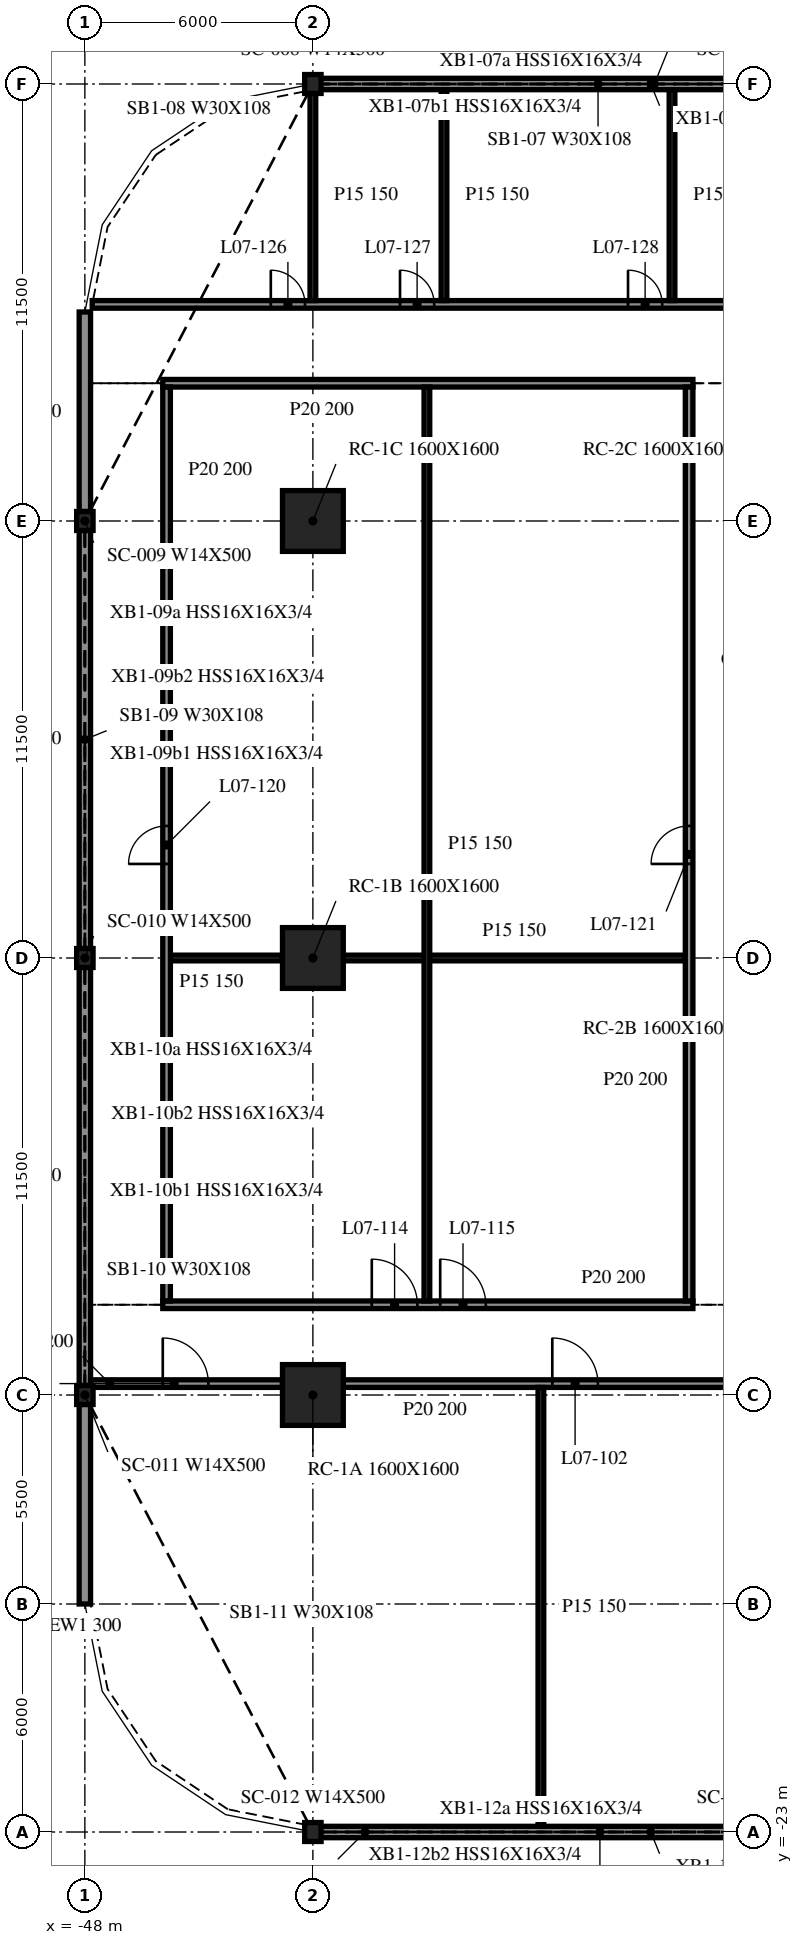
"""IFC4 building model, lengths in metres.
Left out: names, types, materials, properties, quantities, classifications, styles, units other than length and angle.
Written with IfcOpenShell. Run it as: python <this file> out.ifc"""

import sys

from ifc_helpers import new_model, si_unit, direction, frame, frame_2d, origin, origin_2d, place, context, subcontext, project, spatial, rectangle, i_section, extrude, element, fill, save


model = new_model("IFC4")
c1 = context("Model", 3, precision=1e-05, world=origin(), true_north=direction((0.0, 1.0)))
c2 = subcontext(c1, "Body", "Model", "MODEL_VIEW")
j1 = project(units=[si_unit("LENGTHUNIT", "METRE"), si_unit("PLANEANGLEUNIT", "RADIAN")], contexts=[c1])
p1 = place(None, origin())
s1 = spatial("IfcSite", under=j1, at=p1, CompositionType="ELEMENT")
p2 = place(p1, origin())
s2 = spatial("IfcBuilding", under=s1, at=p2, CompositionType="ELEMENT")
p3 = place(p2, frame((0.0, 0.0, 33.0)))
s3 = spatial("IfcBuildingStorey", under=s2, at=p3, CompositionType="ELEMENT", Elevation=33.0)
for number, where, z_axis, x_axis in (
    (1, (-42.0, -11.5, -0.34), (0.0, 0.0, 1.0), (1.0, 0.0, 0.0)),
    (2, (-42.0, 0.0, -0.34), (0.0, 0.0, 1.0), (1.0, 0.0, 0.0)),
    (3, (-42.0, 11.5, -0.34), (0.0, 0.0, 1.0), (1.0, 0.0, 0.0)),
):
    element("IfcColumn", number, at=place(p3, frame(where, z_axis=z_axis, x_axis=x_axis)), inside=s3, PredefinedType="COLUMN", context=c2, shape_type="SweptSolid", body=[
        extrude(rectangle(XDim=1.6, YDim=1.6, at=origin_2d()), origin(), (0.0, 0.0, 1.0), 4.3),
    ])
for number, where, z_axis, x_axis in (
    (4, (-42.0, 23.0, -0.34), (0.0, 0.0, 1.0), (1.0, 0.0, 0.0)),
    (5, (-48.0, 11.5, -0.34), (0.0, 0.0, 1.0), (1.0, 0.0, 0.0)),
    (6, (-48.0, 0.0, -0.34), (0.0, 0.0, 1.0), (1.0, 0.0, 0.0)),
    (7, (-48.0, -11.5, -0.34), (0.0, 0.0, 1.0), (1.0, 0.0, 0.0)),
    (8, (-42.0, -23.0, -0.34), (0.0, 0.0, 1.0), (1.0, 0.0, 0.0)),
):
    element("IfcColumn", number, at=place(p3, frame(where, z_axis=z_axis, x_axis=x_axis)), inside=s3, PredefinedType="COLUMN", context=c2, shape_type="SweptSolid", body=[
        extrude(i_section(OverallWidth=0.432, OverallDepth=0.498, WebThickness=0.056, FlangeThickness=0.089, at=origin_2d()), origin(), (0.0, 0.0, 1.0), 4.3),
    ])
p4 = place(p3, frame((-30.028, 23.0, 0.0), z_axis=(0.0, 0.0, 1.0), x_axis=(-1.0, 0.0, 0.0)))
e9 = element("IfcWall", 9, at=p4, inside=s3, PredefinedType="NOTDEFINED", context=c2, shape_type="SweptSolid", body=[
    extrude(rectangle(XDim=11.944, YDim=0.3, at=frame_2d((5.972, 0.0))), origin(), (0.0, 0.0, 1.0), 3.203),
])
p5 = place(p3, frame((-48.0, 17.0, 0.0), z_axis=(0.0, 0.0, 1.0), x_axis=(0.0, -1.0, 0.0)))
e10 = element("IfcWall", 10, at=p5, inside=s3, PredefinedType="NOTDEFINED", context=c2, shape_type="SweptSolid", body=[
    extrude(rectangle(XDim=5.251, YDim=0.3, at=frame_2d((2.625, 0.0))), origin(), (0.0, 0.0, 1.0), 3.203),
])
for number, where, z_axis, x_axis in (
    (11, (-48.0, 11.251, 0.0), (0.0, 0.0, 1.0), (0.0, -1.0, 0.0)),
    (12, (-48.0, -0.249, 0.0), (0.0, 0.0, 1.0), (0.0, -1.0, 0.0)),
):
    element("IfcWall", number, at=place(p3, frame(where, z_axis=z_axis, x_axis=x_axis)), inside=s3, PredefinedType="NOTDEFINED", context=c2, shape_type="SweptSolid", body=[
        extrude(rectangle(XDim=11.002, YDim=0.3, at=frame_2d((5.501, 0.0))), origin(), (0.0, 0.0, 1.0), 3.203),
    ])
p6 = place(p3, frame((-48.0, -11.749, 0.0), z_axis=(0.0, 0.0, 1.0), x_axis=(0.0, -1.0, 0.0)))
e13 = element("IfcWall", 13, at=p6, inside=s3, PredefinedType="NOTDEFINED", context=c2, shape_type="SweptSolid", body=[
    extrude(rectangle(XDim=5.251, YDim=0.3, at=frame_2d((2.625, 0.0))), origin(), (0.0, 0.0, 1.0), 3.203),
])
p7 = place(p3, frame((-41.972, -23.0, 0.0), z_axis=(0.0, 0.0, 1.0), x_axis=(1.0, 0.0, 0.0)))
e14 = element("IfcWall", 14, at=p7, inside=s3, PredefinedType="NOTDEFINED", context=c2, shape_type="SweptSolid", body=[
    extrude(rectangle(XDim=11.944, YDim=0.3, at=frame_2d((5.972, 0.0))), origin(), (0.0, 0.0, 1.0), 3.203),
])
p8 = place(p3, frame((-47.85, -11.2, 0.0), z_axis=(0.0, 0.0, 1.0), x_axis=(1.0, 0.0, 0.0)))
e15 = element("IfcWall", 15, at=p8, inside=s3, PredefinedType="PARTITIONING", context=c2, shape_type="SweptSolid", body=[
    extrude(rectangle(XDim=5.05, YDim=0.2, at=frame_2d((2.525, 0.0))), origin(), (0.0, 0.0, 1.0), 3.96),
])
p9 = place(p8, frame((1.9, 0.0, 0.0)))
e16 = element("IfcOpeningElement", 16, at=p9, cuts=e15, PredefinedType="OPENING", context=c2, shape_type="SweptSolid", body=[
    extrude(rectangle(XDim=1.2, YDim=2.1, at=frame_2d((0.6, 1.05))), frame((0.0, 0.11, 0.0), z_axis=(0.0, -1.0, 0.0), x_axis=(1.0, 0.0, 0.0)), (0.0, 0.0, 1.0), 0.22),
])
p10 = place(p3, frame((-41.2, -11.2, 0.0), z_axis=(0.0, 0.0, 1.0), x_axis=(1.0, 0.0, 0.0)))
e17 = element("IfcWall", 17, at=p10, inside=s3, PredefinedType="PARTITIONING", context=c2, shape_type="SweptSolid", body=[
    extrude(rectangle(XDim=10.4, YDim=0.2, at=frame_2d((5.2, 0.0))), origin(), (0.0, 0.0, 1.0), 3.96),
])
p11 = place(p10, frame((5.5, 0.0, 0.0)))
e18 = element("IfcOpeningElement", 18, at=p11, cuts=e17, PredefinedType="OPENING", context=c2, shape_type="SweptSolid", body=[
    extrude(rectangle(XDim=1.2, YDim=2.1, at=frame_2d((0.6, 1.05))), frame((0.0, 0.11, 0.0), z_axis=(0.0, -1.0, 0.0), x_axis=(1.0, 0.0, 0.0)), (0.0, 0.0, 1.0), 0.22),
])
p12 = place(p3, frame((-45.95, -9.125, 0.0), z_axis=(0.0, 0.0, 1.0), x_axis=(1.0, 0.0, 0.0)))
e19 = element("IfcWall", 19, at=p12, inside=s3, PredefinedType="PARTITIONING", context=c2, shape_type="SweptSolid", body=[
    extrude(rectangle(XDim=13.95, YDim=0.2, at=frame_2d((6.975, 0.0))), origin(), (0.0, 0.0, 1.0), 3.96),
])
p13 = place(p12, frame((5.5, 0.0, 0.0)))
e20 = element("IfcOpeningElement", 20, at=p13, cuts=e19, PredefinedType="OPENING", context=c2, shape_type="SweptSolid", body=[
    extrude(rectangle(XDim=1.2, YDim=2.1, at=frame_2d((0.6, 1.05))), frame((0.0, 0.11, 0.0), z_axis=(0.0, -1.0, 0.0), x_axis=(1.0, 0.0, 0.0)), (0.0, 0.0, 1.0), 0.22),
])
p14 = place(p12, frame((7.3, 0.0, 0.0)))
e21 = element("IfcOpeningElement", 21, at=p14, cuts=e19, PredefinedType="OPENING", context=c2, shape_type="SweptSolid", body=[
    extrude(rectangle(XDim=1.2, YDim=2.1, at=frame_2d((0.6, 1.05))), frame((0.0, 0.11, 0.0), z_axis=(0.0, -1.0, 0.0), x_axis=(1.0, 0.0, 0.0)), (0.0, 0.0, 1.0), 0.22),
])
p15 = place(p3, frame((-45.75, 0.0, 0.0), z_axis=(0.0, 0.0, 1.0), x_axis=(1.0, 0.0, 0.0)))
e22 = element("IfcWall", 22, at=p15, inside=s3, PredefinedType="PARTITIONING", context=c2, shape_type="SweptSolid", body=[
    extrude(rectangle(XDim=2.95, YDim=0.15, at=frame_2d((1.475, 0.0))), origin(), (0.0, 0.0, 1.0), 3.96),
])
p16 = place(p3, frame((-41.2, 0.0, 0.0), z_axis=(0.0, 0.0, 1.0), x_axis=(1.0, 0.0, 0.0)))
e23 = element("IfcWall", 23, at=p16, inside=s3, PredefinedType="PARTITIONING", context=c2, shape_type="SweptSolid", body=[
    extrude(rectangle(XDim=9.0, YDim=0.15, at=frame_2d((4.5, 0.0))), origin(), (0.0, 0.0, 1.0), 3.96),
])
p17 = place(p3, frame((-45.95, 15.125, 0.0), z_axis=(0.0, 0.0, 1.0), x_axis=(1.0, 0.0, 0.0)))
e24 = element("IfcWall", 24, at=p17, inside=s3, PredefinedType="PARTITIONING", context=c2, shape_type="SweptSolid", body=[
    extrude(rectangle(XDim=13.95, YDim=0.2, at=frame_2d((6.975, 0.0))), origin(), (0.0, 0.0, 1.0), 3.96),
])
p18 = place(p3, frame((-47.807, 17.2, 0.0), z_axis=(0.0, 0.0, 1.0), x_axis=(1.0, 0.0, 0.0)))
e25 = element("IfcWall", 25, at=p18, inside=s3, PredefinedType="PARTITIONING", context=c2, shape_type="SweptSolid", body=[
    extrude(rectangle(XDim=95.615, YDim=0.2, at=frame_2d((47.807, 0.0))), origin(), (0.0, 0.0, 1.0), 3.96),
])
p19 = place(p18, frame((4.7, 0.0, 0.0)))
e26 = element("IfcOpeningElement", 26, at=p19, cuts=e25, PredefinedType="OPENING", context=c2, shape_type="SweptSolid", body=[
    extrude(rectangle(XDim=0.9, YDim=2.1, at=frame_2d((0.45, 1.05))), frame((0.0, 0.11, 0.0), z_axis=(0.0, -1.0, 0.0), x_axis=(1.0, 0.0, 0.0)), (0.0, 0.0, 1.0), 0.22),
])
p20 = place(p18, frame((8.1, 0.0, 0.0)))
e27 = element("IfcOpeningElement", 27, at=p20, cuts=e25, PredefinedType="OPENING", context=c2, shape_type="SweptSolid", body=[
    extrude(rectangle(XDim=0.9, YDim=2.1, at=frame_2d((0.45, 1.05))), frame((0.0, 0.11, 0.0), z_axis=(0.0, -1.0, 0.0), x_axis=(1.0, 0.0, 0.0)), (0.0, 0.0, 1.0), 0.22),
])
p21 = place(p18, frame((14.1, 0.0, 0.0)))
e28 = element("IfcOpeningElement", 28, at=p21, cuts=e25, PredefinedType="OPENING", context=c2, shape_type="SweptSolid", body=[
    extrude(rectangle(XDim=0.9, YDim=2.1, at=frame_2d((0.45, 1.05))), frame((0.0, 0.11, 0.0), z_axis=(0.0, -1.0, 0.0), x_axis=(1.0, 0.0, 0.0)), (0.0, 0.0, 1.0), 0.22),
])
p22 = place(p18, frame((22.7, 0.0, 0.0)))
e29 = element("IfcOpeningElement", 29, at=p22, cuts=e25, PredefinedType="OPENING", context=c2, shape_type="SweptSolid", body=[
    extrude(rectangle(XDim=0.9, YDim=2.1, at=frame_2d((0.45, 1.05))), frame((0.0, 0.11, 0.0), z_axis=(0.0, -1.0, 0.0), x_axis=(1.0, 0.0, 0.0)), (0.0, 0.0, 1.0), 0.22),
])
p23 = place(p18, frame((28.7, 0.0, 0.0)))
e30 = element("IfcOpeningElement", 30, at=p23, cuts=e25, PredefinedType="OPENING", context=c2, shape_type="SweptSolid", body=[
    extrude(rectangle(XDim=0.9, YDim=2.1, at=frame_2d((0.45, 1.05))), frame((0.0, 0.11, 0.0), z_axis=(0.0, -1.0, 0.0), x_axis=(1.0, 0.0, 0.0)), (0.0, 0.0, 1.0), 0.22),
])
p24 = place(p18, frame((34.7, 0.0, 0.0)))
e31 = element("IfcOpeningElement", 31, at=p24, cuts=e25, PredefinedType="OPENING", context=c2, shape_type="SweptSolid", body=[
    extrude(rectangle(XDim=0.9, YDim=2.1, at=frame_2d((0.45, 1.05))), frame((0.0, 0.11, 0.0), z_axis=(0.0, -1.0, 0.0), x_axis=(1.0, 0.0, 0.0)), (0.0, 0.0, 1.0), 0.22),
])
p25 = place(p18, frame((38.1, 0.0, 0.0)))
e32 = element("IfcOpeningElement", 32, at=p25, cuts=e25, PredefinedType="OPENING", context=c2, shape_type="SweptSolid", body=[
    extrude(rectangle(XDim=0.9, YDim=2.1, at=frame_2d((0.45, 1.05))), frame((0.0, 0.11, 0.0), z_axis=(0.0, -1.0, 0.0), x_axis=(1.0, 0.0, 0.0)), (0.0, 0.0, 1.0), 0.22),
])
p26 = place(p18, frame((43.7, 0.0, 0.0)))
e33 = element("IfcOpeningElement", 33, at=p26, cuts=e25, PredefinedType="OPENING", context=c2, shape_type="SweptSolid", body=[
    extrude(rectangle(XDim=0.9, YDim=2.1, at=frame_2d((0.45, 1.05))), frame((0.0, 0.11, 0.0), z_axis=(0.0, -1.0, 0.0), x_axis=(1.0, 0.0, 0.0)), (0.0, 0.0, 1.0), 0.22),
])
p27 = place(p18, frame((47.3, 0.0, 0.0)))
e34 = element("IfcOpeningElement", 34, at=p27, cuts=e25, PredefinedType="OPENING", context=c2, shape_type="SweptSolid", body=[
    extrude(rectangle(XDim=0.9, YDim=2.1, at=frame_2d((0.45, 1.05))), frame((0.0, 0.11, 0.0), z_axis=(0.0, -1.0, 0.0), x_axis=(1.0, 0.0, 0.0)), (0.0, 0.0, 1.0), 0.22),
])
p28 = place(p18, frame((54.1, 0.0, 0.0)))
e35 = element("IfcOpeningElement", 35, at=p28, cuts=e25, PredefinedType="OPENING", context=c2, shape_type="SweptSolid", body=[
    extrude(rectangle(XDim=0.9, YDim=2.1, at=frame_2d((0.45, 1.05))), frame((0.0, 0.11, 0.0), z_axis=(0.0, -1.0, 0.0), x_axis=(1.0, 0.0, 0.0)), (0.0, 0.0, 1.0), 0.22),
])
p29 = place(p18, frame((60.1, 0.0, 0.0)))
e36 = element("IfcOpeningElement", 36, at=p29, cuts=e25, PredefinedType="OPENING", context=c2, shape_type="SweptSolid", body=[
    extrude(rectangle(XDim=0.9, YDim=2.1, at=frame_2d((0.45, 1.05))), frame((0.0, 0.11, 0.0), z_axis=(0.0, -1.0, 0.0), x_axis=(1.0, 0.0, 0.0)), (0.0, 0.0, 1.0), 0.22),
])
p30 = place(p18, frame((66.1, 0.0, 0.0)))
e37 = element("IfcOpeningElement", 37, at=p30, cuts=e25, PredefinedType="OPENING", context=c2, shape_type="SweptSolid", body=[
    extrude(rectangle(XDim=0.9, YDim=2.1, at=frame_2d((0.45, 1.05))), frame((0.0, 0.11, 0.0), z_axis=(0.0, -1.0, 0.0), x_axis=(1.0, 0.0, 0.0)), (0.0, 0.0, 1.0), 0.22),
])
p31 = place(p18, frame((69.1, 0.0, 0.0)))
e38 = element("IfcOpeningElement", 38, at=p31, cuts=e25, PredefinedType="OPENING", context=c2, shape_type="SweptSolid", body=[
    extrude(rectangle(XDim=0.9, YDim=2.1, at=frame_2d((0.45, 1.05))), frame((0.0, 0.11, 0.0), z_axis=(0.0, -1.0, 0.0), x_axis=(1.0, 0.0, 0.0)), (0.0, 0.0, 1.0), 0.22),
])
p32 = place(p18, frame((75.1, 0.0, 0.0)))
e39 = element("IfcOpeningElement", 39, at=p32, cuts=e25, PredefinedType="OPENING", context=c2, shape_type="SweptSolid", body=[
    extrude(rectangle(XDim=0.9, YDim=2.1, at=frame_2d((0.45, 1.05))), frame((0.0, 0.11, 0.0), z_axis=(0.0, -1.0, 0.0), x_axis=(1.0, 0.0, 0.0)), (0.0, 0.0, 1.0), 0.22),
])
p33 = place(p18, frame((84.1, 0.0, 0.0)))
e40 = element("IfcOpeningElement", 40, at=p33, cuts=e25, PredefinedType="OPENING", context=c2, shape_type="SweptSolid", body=[
    extrude(rectangle(XDim=0.9, YDim=2.1, at=frame_2d((0.45, 1.05))), frame((0.0, 0.11, 0.0), z_axis=(0.0, -1.0, 0.0), x_axis=(1.0, 0.0, 0.0)), (0.0, 0.0, 1.0), 0.22),
])
p34 = place(p18, frame((90.1, 0.0, 0.0)))
e41 = element("IfcOpeningElement", 41, at=p34, cuts=e25, PredefinedType="OPENING", context=c2, shape_type="SweptSolid", body=[
    extrude(rectangle(XDim=0.9, YDim=2.1, at=frame_2d((0.45, 1.05))), frame((0.0, 0.11, 0.0), z_axis=(0.0, -1.0, 0.0), x_axis=(1.0, 0.0, 0.0)), (0.0, 0.0, 1.0), 0.22),
])
p35 = place(p3, frame((-45.85, -9.025, 0.0), z_axis=(0.0, 0.0, 1.0), x_axis=(0.0, 1.0, 0.0)))
e42 = element("IfcWall", 42, at=p35, inside=s3, PredefinedType="PARTITIONING", context=c2, shape_type="SweptSolid", body=[
    extrude(rectangle(XDim=24.05, YDim=0.2, at=frame_2d((12.025, 0.0))), origin(), (0.0, 0.0, 1.0), 3.96),
])
p36 = place(p35, frame((11.5, 0.0, 0.0)))
e43 = element("IfcOpeningElement", 43, at=p36, cuts=e42, PredefinedType="OPENING", context=c2, shape_type="SweptSolid", body=[
    extrude(rectangle(XDim=1.0, YDim=2.1, at=frame_2d((0.5, 1.05))), frame((0.0, 0.11, 0.0), z_axis=(0.0, -1.0, 0.0), x_axis=(1.0, 0.0, 0.0)), (0.0, 0.0, 1.0), 0.22),
])
p37 = place(p3, frame((-42.0, 17.3, 0.0), z_axis=(0.0, 0.0, 1.0), x_axis=(0.0, 1.0, 0.0)))
e44 = element("IfcWall", 44, at=p37, inside=s3, PredefinedType="PARTITIONING", context=c2, shape_type="SweptSolid", body=[
    extrude(rectangle(XDim=5.547, YDim=0.15, at=frame_2d((2.773, 0.0))), origin(), (0.0, 0.0, 1.0), 3.96),
])
p38 = place(p3, frame((-39.0, -9.025, 0.0), z_axis=(0.0, 0.0, 1.0), x_axis=(0.0, 1.0, 0.0)))
e45 = element("IfcWall", 45, at=p38, inside=s3, PredefinedType="PARTITIONING", context=c2, shape_type="SweptSolid", body=[
    extrude(rectangle(XDim=24.05, YDim=0.15, at=frame_2d((12.025, 0.0))), origin(), (0.0, 0.0, 1.0), 3.96),
])
p39 = place(p3, frame((-38.55, 17.3, 0.0), z_axis=(0.0, 0.0, 1.0), x_axis=(0.0, 1.0, 0.0)))
e46 = element("IfcWall", 46, at=p39, inside=s3, PredefinedType="PARTITIONING", context=c2, shape_type="SweptSolid", body=[
    extrude(rectangle(XDim=5.55, YDim=0.15, at=frame_2d((2.775, 0.0))), origin(), (0.0, 0.0, 1.0), 3.96),
])
p40 = place(p3, frame((-36.0, -22.85, 0.0), z_axis=(0.0, 0.0, 1.0), x_axis=(0.0, 1.0, 0.0)))
e47 = element("IfcWall", 47, at=p40, inside=s3, PredefinedType="PARTITIONING", context=c2, shape_type="SweptSolid", body=[
    extrude(rectangle(XDim=11.55, YDim=0.15, at=frame_2d((5.775, 0.0))), origin(), (0.0, 0.0, 1.0), 3.96),
])
p41 = place(p3, frame((-32.55, 17.3, 0.0), z_axis=(0.0, 0.0, 1.0), x_axis=(0.0, 1.0, 0.0)))
e48 = element("IfcWall", 48, at=p41, inside=s3, PredefinedType="PARTITIONING", context=c2, shape_type="SweptSolid", body=[
    extrude(rectangle(XDim=5.55, YDim=0.15, at=frame_2d((2.775, 0.0))), origin(), (0.0, 0.0, 1.0), 3.96),
])
p42 = place(p3, frame((-32.1, -9.025, 0.0), z_axis=(0.0, 0.0, 1.0), x_axis=(0.0, 1.0, 0.0)))
e49 = element("IfcWall", 49, at=p42, inside=s3, PredefinedType="PARTITIONING", context=c2, shape_type="SweptSolid", body=[
    extrude(rectangle(XDim=24.05, YDim=0.2, at=frame_2d((12.025, 0.0))), origin(), (0.0, 0.0, 1.0), 3.96),
])
p43 = place(p42, frame((11.5, 0.0, 0.0)))
e50 = element("IfcOpeningElement", 50, at=p43, cuts=e49, PredefinedType="OPENING", context=c2, shape_type="SweptSolid", body=[
    extrude(rectangle(XDim=1.0, YDim=2.1, at=frame_2d((0.5, 1.05))), frame((0.0, 0.11, 0.0), z_axis=(0.0, -1.0, 0.0), x_axis=(1.0, 0.0, 0.0)), (0.0, 0.0, 1.0), 0.22),
])
p44 = place(p9, origin())
e51 = element("IfcDoor", 51, at=p44, inside=s3, OperationType="SINGLE_SWING_RIGHT", PredefinedType="DOOR", context=c2, shape_type="SweptSolid", body=[
    extrude(rectangle(XDim=1.2, YDim=2.1, at=frame_2d((0.6, 1.05))), frame((0.0, 0.025, 0.0), z_axis=(0.0, -1.0, 0.0), x_axis=(1.0, 0.0, 0.0)), (0.0, 0.0, 1.0), 0.05),
])
fill(e16, e51)
p45 = place(p11, origin())
e52 = element("IfcDoor", 52, at=p45, inside=s3, OperationType="SINGLE_SWING_LEFT", PredefinedType="DOOR", context=c2, shape_type="SweptSolid", body=[
    extrude(rectangle(XDim=1.2, YDim=2.1, at=frame_2d((0.6, 1.05))), frame((0.0, 0.025, 0.0), z_axis=(0.0, -1.0, 0.0), x_axis=(1.0, 0.0, 0.0)), (0.0, 0.0, 1.0), 0.05),
])
fill(e18, e52)
p46 = place(p13, origin())
e53 = element("IfcDoor", 53, at=p46, inside=s3, OperationType="SINGLE_SWING_LEFT", PredefinedType="DOOR", context=c2, shape_type="SweptSolid", body=[
    extrude(rectangle(XDim=1.2, YDim=2.1, at=frame_2d((0.6, 1.05))), frame((0.0, 0.025, 0.0), z_axis=(0.0, -1.0, 0.0), x_axis=(1.0, 0.0, 0.0)), (0.0, 0.0, 1.0), 0.05),
])
fill(e20, e53)
p47 = place(p14, origin())
e54 = element("IfcDoor", 54, at=p47, inside=s3, OperationType="SINGLE_SWING_RIGHT", PredefinedType="DOOR", context=c2, shape_type="SweptSolid", body=[
    extrude(rectangle(XDim=1.2, YDim=2.1, at=frame_2d((0.6, 1.05))), frame((0.0, 0.025, 0.0), z_axis=(0.0, -1.0, 0.0), x_axis=(1.0, 0.0, 0.0)), (0.0, 0.0, 1.0), 0.05),
])
fill(e21, e54)
p48 = place(p36, origin())
e55 = element("IfcDoor", 55, at=p48, inside=s3, OperationType="SINGLE_SWING_RIGHT", PredefinedType="DOOR", context=c2, shape_type="SweptSolid", body=[
    extrude(rectangle(XDim=1.0, YDim=2.1, at=frame_2d((0.5, 1.05))), frame((0.0, 0.025, 0.0), z_axis=(0.0, -1.0, 0.0), x_axis=(1.0, 0.0, 0.0)), (0.0, 0.0, 1.0), 0.05),
])
fill(e43, e55)
p49 = place(p43, origin())
e56 = element("IfcDoor", 56, at=p49, inside=s3, OperationType="SINGLE_SWING_LEFT", PredefinedType="DOOR", context=c2, shape_type="SweptSolid", body=[
    extrude(rectangle(XDim=1.0, YDim=2.1, at=frame_2d((0.5, 1.05))), frame((0.0, 0.025, 0.0), z_axis=(0.0, -1.0, 0.0), x_axis=(1.0, 0.0, 0.0)), (0.0, 0.0, 1.0), 0.05),
])
fill(e50, e56)
p50 = place(p19, origin())
e57 = element("IfcDoor", 57, at=p50, inside=s3, OperationType="SINGLE_SWING_LEFT", PredefinedType="DOOR", context=c2, shape_type="SweptSolid", body=[
    extrude(rectangle(XDim=0.9, YDim=2.1, at=frame_2d((0.45, 1.05))), frame((0.0, 0.025, 0.0), z_axis=(0.0, -1.0, 0.0), x_axis=(1.0, 0.0, 0.0)), (0.0, 0.0, 1.0), 0.05),
])
fill(e26, e57)
p51 = place(p20, origin())
e58 = element("IfcDoor", 58, at=p51, inside=s3, OperationType="SINGLE_SWING_LEFT", PredefinedType="DOOR", context=c2, shape_type="SweptSolid", body=[
    extrude(rectangle(XDim=0.9, YDim=2.1, at=frame_2d((0.45, 1.05))), frame((0.0, 0.025, 0.0), z_axis=(0.0, -1.0, 0.0), x_axis=(1.0, 0.0, 0.0)), (0.0, 0.0, 1.0), 0.05),
])
fill(e27, e58)
p52 = place(p21, origin())
e59 = element("IfcDoor", 59, at=p52, inside=s3, OperationType="SINGLE_SWING_LEFT", PredefinedType="DOOR", context=c2, shape_type="SweptSolid", body=[
    extrude(rectangle(XDim=0.9, YDim=2.1, at=frame_2d((0.45, 1.05))), frame((0.0, 0.025, 0.0), z_axis=(0.0, -1.0, 0.0), x_axis=(1.0, 0.0, 0.0)), (0.0, 0.0, 1.0), 0.05),
])
fill(e28, e59)
save(model, sys.argv[1])
